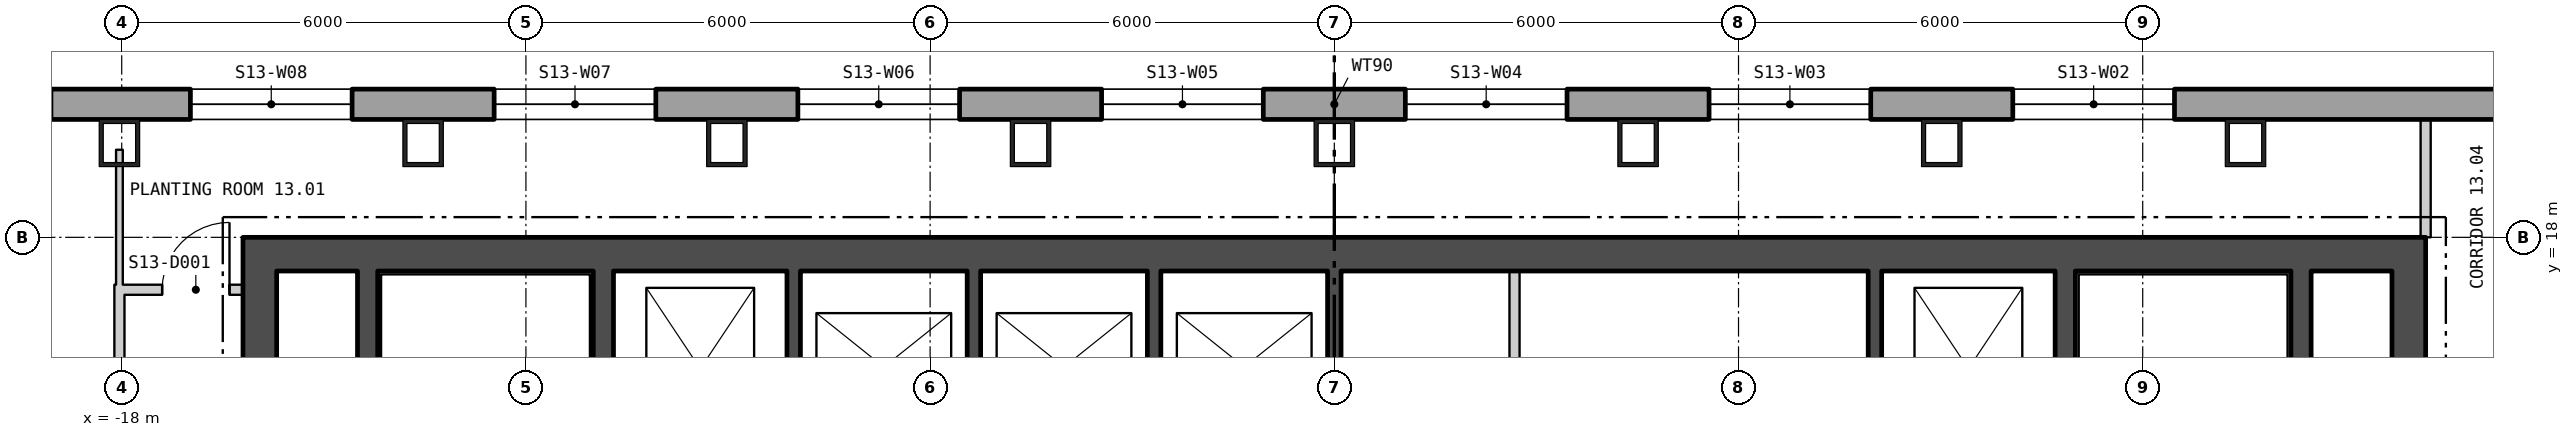
"""IFC4 building model, lengths in metres.
Left out: names, types, materials, properties, quantities, classifications, styles, units other than length and angle.
Written with IfcOpenShell. Run it as: python <this file> out.ifc"""

import sys

from ifc_helpers import new_model, si_unit, direction, frame, frame_2d, origin, origin_2d, place, context, subcontext, project, spatial, polyline, rectangle, hollow_rectangle, outline, extrude, element, fill, save


model = new_model("IFC4")
c1 = context("Model", 3, precision=1e-05, world=origin(), true_north=direction((0.0, 1.0)))
c2 = subcontext(c1, "Body", "Model", "MODEL_VIEW")
j1 = project(units=[si_unit("LENGTHUNIT", "METRE"), si_unit("PLANEANGLEUNIT", "RADIAN")], contexts=[c1])
p1 = place(None, origin())
s1 = spatial("IfcSite", under=j1, at=p1, CompositionType="ELEMENT")
p2 = place(p1, origin())
s2 = spatial("IfcBuilding", under=s1, at=p2, CompositionType="ELEMENT")
p3 = place(p2, frame((0.0, 0.0, 174.9)))
s3 = spatial("IfcBuildingStorey", under=s2, at=p3, CompositionType="ELEMENT", Elevation=174.9)
for number, where, z_axis, x_axis in (
    (1, (13.526, 19.4, 0.0), (0.0, 0.0, 1.0), (-1.0, 0.0, 0.0)),
    (2, (9.017, 19.4, 0.0), (0.0, 0.0, 1.0), (-1.0, 0.0, 0.0)),
    (3, (4.509, 19.4, 0.0), (0.0, 0.0, 1.0), (-1.0, 0.0, 0.0)),
    (4, (0.0, 19.4, 0.0), (0.0, 0.0, 1.0), (-1.0, 0.0, 0.0)),
    (5, (-4.509, 19.4, 0.0), (0.0, 0.0, 1.0), (-1.0, 0.0, 0.0)),
    (6, (-9.017, 19.4, 0.0), (0.0, 0.0, 1.0), (-1.0, 0.0, 0.0)),
    (7, (-13.526, 19.4, 0.0), (0.0, 0.0, 1.0), (-1.0, 0.0, 0.0)),
    (8, (-18.034, 19.4, 0.0), (0.0, 0.0, 1.0), (-1.0, 0.0, 0.0)),
):
    element("IfcColumn", number, at=place(p3, frame(where, z_axis=z_axis, x_axis=x_axis)), inside=s3, PredefinedType="COLUMN", context=c2, shape_type="SweptSolid", body=[
        extrude(hollow_rectangle(XDim=0.6, YDim=0.7, WallThickness=0.06, at=origin_2d()), origin(), (0.0, 0.0, 1.0), 3.9),
    ])
p4 = place(p3, frame((22.875, 19.975, -0.4), z_axis=(0.0, 0.0, 1.0), x_axis=(-1.0, 0.0, 0.0)))
e9 = element("IfcWall", 9, at=p4, inside=s3, PredefinedType="SOLIDWALL", context=c2, shape_type="SweptSolid", body=[
    extrude(outline(polyline([(-0.13, -0.225), (45.88, -0.225), (45.62, 0.225), (0.13, 0.225), (-0.13, -0.225)])), origin(), (0.0, 0.0, 1.0), 3.9),
])
p5 = place(p4, frame((1.425, 0.0, 1.3)))
e10 = element("IfcOpeningElement", 10, at=p5, cuts=e9, PredefinedType="OPENING", context=c2, shape_type="SweptSolid", body=[
    extrude(rectangle(XDim=2.4, YDim=2.0, at=frame_2d((1.2, 1.0))), frame((0.0, 0.235, 0.0), z_axis=(0.0, -1.0, 0.0), x_axis=(1.0, 0.0, 0.0)), (0.0, 0.0, 1.0), 0.47),
])
p6 = place(p4, frame((10.403, 0.0, 1.3)))
e11 = element("IfcOpeningElement", 11, at=p6, cuts=e9, PredefinedType="OPENING", context=c2, shape_type="SweptSolid", body=[
    extrude(rectangle(XDim=2.4, YDim=2.0, at=frame_2d((1.2, 1.0))), frame((0.0, 0.235, 0.0), z_axis=(0.0, -1.0, 0.0), x_axis=(1.0, 0.0, 0.0)), (0.0, 0.0, 1.0), 0.47),
])
p7 = place(p4, frame((14.912, 0.0, 1.3)))
e12 = element("IfcOpeningElement", 12, at=p7, cuts=e9, PredefinedType="OPENING", context=c2, shape_type="SweptSolid", body=[
    extrude(rectangle(XDim=2.4, YDim=2.0, at=frame_2d((1.2, 1.0))), frame((0.0, 0.235, 0.0), z_axis=(0.0, -1.0, 0.0), x_axis=(1.0, 0.0, 0.0)), (0.0, 0.0, 1.0), 0.47),
])
p8 = place(p4, frame((19.421, 0.0, 1.3)))
e13 = element("IfcOpeningElement", 13, at=p8, cuts=e9, PredefinedType="OPENING", context=c2, shape_type="SweptSolid", body=[
    extrude(rectangle(XDim=2.4, YDim=2.0, at=frame_2d((1.2, 1.0))), frame((0.0, 0.235, 0.0), z_axis=(0.0, -1.0, 0.0), x_axis=(1.0, 0.0, 0.0)), (0.0, 0.0, 1.0), 0.47),
])
p9 = place(p4, frame((23.929, 0.0, 1.3)))
e14 = element("IfcOpeningElement", 14, at=p9, cuts=e9, PredefinedType="OPENING", context=c2, shape_type="SweptSolid", body=[
    extrude(rectangle(XDim=2.4, YDim=2.0, at=frame_2d((1.2, 1.0))), frame((0.0, 0.235, 0.0), z_axis=(0.0, -1.0, 0.0), x_axis=(1.0, 0.0, 0.0)), (0.0, 0.0, 1.0), 0.47),
])
p10 = place(p4, frame((28.438, 0.0, 1.3)))
e15 = element("IfcOpeningElement", 15, at=p10, cuts=e9, PredefinedType="OPENING", context=c2, shape_type="SweptSolid", body=[
    extrude(rectangle(XDim=2.4, YDim=2.0, at=frame_2d((1.2, 1.0))), frame((0.0, 0.235, 0.0), z_axis=(0.0, -1.0, 0.0), x_axis=(1.0, 0.0, 0.0)), (0.0, 0.0, 1.0), 0.47),
])
p11 = place(p4, frame((32.947, 0.0, 1.3)))
e16 = element("IfcOpeningElement", 16, at=p11, cuts=e9, PredefinedType="OPENING", context=c2, shape_type="SweptSolid", body=[
    extrude(rectangle(XDim=2.4, YDim=2.0, at=frame_2d((1.2, 1.0))), frame((0.0, 0.235, 0.0), z_axis=(0.0, -1.0, 0.0), x_axis=(1.0, 0.0, 0.0)), (0.0, 0.0, 1.0), 0.47),
])
p12 = place(p4, frame((37.455, 0.0, 1.3)))
e17 = element("IfcOpeningElement", 17, at=p12, cuts=e9, PredefinedType="OPENING", context=c2, shape_type="SweptSolid", body=[
    extrude(rectangle(XDim=2.4, YDim=2.0, at=frame_2d((1.2, 1.0))), frame((0.0, 0.235, 0.0), z_axis=(0.0, -1.0, 0.0), x_axis=(1.0, 0.0, 0.0)), (0.0, 0.0, 1.0), 0.47),
])
p13 = place(p4, frame((41.925, 0.0, 1.3)))
e18 = element("IfcOpeningElement", 18, at=p13, cuts=e9, PredefinedType="OPENING", context=c2, shape_type="SweptSolid", body=[
    extrude(rectangle(XDim=2.4, YDim=2.0, at=frame_2d((1.2, 1.0))), frame((0.0, 0.235, 0.0), z_axis=(0.0, -1.0, 0.0), x_axis=(1.0, 0.0, 0.0)), (0.0, 0.0, 1.0), 0.47),
])
p14 = place(p3, frame((-16.2, 17.75, 0.0), z_axis=(0.0, 0.0, 1.0), x_axis=(1.0, 0.0, 0.0)))
e19 = element("IfcWall", 19, at=p14, inside=s3, PredefinedType="SHEAR", context=c2, shape_type="SweptSolid", body=[
    extrude(rectangle(XDim=32.4, YDim=0.5, at=frame_2d((16.2, 0.0))), origin(), (0.0, 0.0, 1.0), 3.7),
])
p15 = place(p3, frame((-15.95, 2.5, 0.0), z_axis=(0.0, 0.0, 1.0), x_axis=(0.0, 1.0, 0.0)))
e20 = element("IfcWall", 20, at=p15, inside=s3, PredefinedType="SHEAR", context=c2, shape_type="SweptSolid", body=[
    extrude(rectangle(XDim=15.0, YDim=0.5, at=frame_2d((7.5, 0.0))), origin(), (0.0, 0.0, 1.0), 3.7),
])
p16 = place(p15, frame((4.35, 0.0, 0.0)))
e21 = element("IfcOpeningElement", 21, at=p16, cuts=e20, PredefinedType="OPENING", context=c2, shape_type="SweptSolid", body=[
    extrude(rectangle(XDim=1.5, YDim=2.1, at=frame_2d((0.75, 1.05))), frame((0.0, 0.26, 0.0), z_axis=(0.0, -1.0, 0.0), x_axis=(1.0, 0.0, 0.0)), (0.0, 0.0, 1.0), 0.52),
])
p17 = place(p15, frame((0.4, 0.0, 0.0)))
e22 = element("IfcOpeningElement", 22, at=p17, cuts=e20, PredefinedType="OPENING", context=c2, shape_type="SweptSolid", body=[
    extrude(rectangle(XDim=1.0, YDim=2.1, at=frame_2d((0.5, 1.05))), frame((0.0, 0.26, 0.0), z_axis=(0.0, -1.0, 0.0), x_axis=(1.0, 0.0, 0.0)), (0.0, 0.0, 1.0), 0.52),
])
p18 = place(p15, frame((2.475, 0.0, 0.0)))
e23 = element("IfcOpeningElement", 23, at=p18, cuts=e20, PredefinedType="OPENING", context=c2, shape_type="SweptSolid", body=[
    extrude(rectangle(XDim=0.9, YDim=2.1, at=frame_2d((0.45, 1.05))), frame((0.0, 0.26, 0.0), z_axis=(0.0, -1.0, 0.0), x_axis=(1.0, 0.0, 0.0)), (0.0, 0.0, 1.0), 0.52),
])
p19 = place(p15, frame((6.677, 0.0, 0.0)))
e24 = element("IfcOpeningElement", 24, at=p19, cuts=e20, PredefinedType="OPENING", context=c2, shape_type="SweptSolid", body=[
    extrude(rectangle(XDim=0.9, YDim=2.1, at=frame_2d((0.45, 1.05))), frame((0.0, 0.26, 0.0), z_axis=(0.0, -1.0, 0.0), x_axis=(1.0, 0.0, 0.0)), (0.0, 0.0, 1.0), 0.52),
])
p20 = place(p15, frame((11.252, 0.0, 0.0)))
e25 = element("IfcOpeningElement", 25, at=p20, cuts=e20, PredefinedType="OPENING", context=c2, shape_type="SweptSolid", body=[
    extrude(rectangle(XDim=0.9, YDim=2.1, at=frame_2d((0.45, 1.05))), frame((0.0, 0.26, 0.0), z_axis=(0.0, -1.0, 0.0), x_axis=(1.0, 0.0, 0.0)), (0.0, 0.0, 1.0), 0.52),
])
p21 = place(p3, frame((15.95, 2.5, 0.0), z_axis=(0.0, 0.0, 1.0), x_axis=(0.0, 1.0, 0.0)))
e26 = element("IfcWall", 26, at=p21, inside=s3, PredefinedType="SHEAR", context=c2, shape_type="SweptSolid", body=[
    extrude(rectangle(XDim=15.0, YDim=0.5, at=frame_2d((7.5, 0.0))), origin(), (0.0, 0.0, 1.0), 3.7),
])
p22 = place(p21, frame((4.35, 0.0, 0.0)))
e27 = element("IfcOpeningElement", 27, at=p22, cuts=e26, PredefinedType="OPENING", context=c2, shape_type="SweptSolid", body=[
    extrude(rectangle(XDim=1.5, YDim=2.1, at=frame_2d((0.75, 1.05))), frame((0.0, 0.26, 0.0), z_axis=(0.0, -1.0, 0.0), x_axis=(1.0, 0.0, 0.0)), (0.0, 0.0, 1.0), 0.52),
])
p23 = place(p21, frame((0.825, 0.0, 0.0)))
e28 = element("IfcOpeningElement", 28, at=p23, cuts=e26, PredefinedType="OPENING", context=c2, shape_type="SweptSolid", body=[
    extrude(rectangle(XDim=0.9, YDim=2.1, at=frame_2d((0.45, 1.05))), frame((0.0, 0.26, 0.0), z_axis=(0.0, -1.0, 0.0), x_axis=(1.0, 0.0, 0.0)), (0.0, 0.0, 1.0), 0.52),
])
p24 = place(p21, frame((3.0, 0.0, 0.0)))
e29 = element("IfcOpeningElement", 29, at=p24, cuts=e26, PredefinedType="OPENING", context=c2, shape_type="SweptSolid", body=[
    extrude(rectangle(XDim=0.9, YDim=2.1, at=frame_2d((0.45, 1.05))), frame((0.0, 0.26, 0.0), z_axis=(0.0, -1.0, 0.0), x_axis=(1.0, 0.0, 0.0)), (0.0, 0.0, 1.0), 0.52),
])
p25 = place(p21, frame((6.716, 0.0, 0.0)))
e30 = element("IfcOpeningElement", 30, at=p25, cuts=e26, PredefinedType="OPENING", context=c2, shape_type="SweptSolid", body=[
    extrude(rectangle(XDim=1.0, YDim=2.1, at=frame_2d((0.5, 1.05))), frame((0.0, 0.26, 0.0), z_axis=(0.0, -1.0, 0.0), x_axis=(1.0, 0.0, 0.0)), (0.0, 0.0, 1.0), 0.52),
])
p26 = place(p21, frame((11.341, 0.0, 0.0)))
e31 = element("IfcOpeningElement", 31, at=p26, cuts=e26, PredefinedType="OPENING", context=c2, shape_type="SweptSolid", body=[
    extrude(rectangle(XDim=0.9, YDim=2.1, at=frame_2d((0.45, 1.05))), frame((0.0, 0.26, 0.0), z_axis=(0.0, -1.0, 0.0), x_axis=(1.0, 0.0, 0.0)), (0.0, 0.0, 1.0), 0.52),
])
p27 = place(p3, frame((-10.85, 2.5, 0.0), z_axis=(0.0, 0.0, 1.0), x_axis=(0.0, 1.0, 0.0)))
e32 = element("IfcWall", 32, at=p27, inside=s3, PredefinedType="SHEAR", context=c2, shape_type="SweptSolid", body=[
    extrude(rectangle(XDim=15.0, YDim=0.3, at=frame_2d((7.5, 0.0))), origin(), (0.0, 0.0, 1.0), 3.7),
])
p28 = place(p27, frame((3.475, 0.0, 0.0)))
e33 = element("IfcOpeningElement", 33, at=p28, cuts=e32, PredefinedType="OPENING", context=c2, shape_type="SweptSolid", body=[
    extrude(rectangle(XDim=1.25, YDim=2.1, at=frame_2d((0.625, 1.05))), frame((0.0, 0.16, 0.0), z_axis=(0.0, -1.0, 0.0), x_axis=(1.0, 0.0, 0.0)), (0.0, 0.0, 1.0), 0.32),
])
p29 = place(p27, frame((1.125, 0.0, 0.0)))
e34 = element("IfcOpeningElement", 34, at=p29, cuts=e32, PredefinedType="OPENING", context=c2, shape_type="SweptSolid", body=[
    extrude(rectangle(XDim=1.0, YDim=2.1, at=frame_2d((0.5, 1.05))), frame((0.0, 0.16, 0.0), z_axis=(0.0, -1.0, 0.0), x_axis=(1.0, 0.0, 0.0)), (0.0, 0.0, 1.0), 0.32),
])
p30 = place(p3, frame((-14.35, 2.5, 0.0), z_axis=(0.0, 0.0, 1.0), x_axis=(0.0, 1.0, 0.0)))
e35 = element("IfcWall", 35, at=p30, inside=s3, PredefinedType="SHEAR", context=c2, shape_type="SweptSolid", body=[
    extrude(rectangle(XDim=15.0, YDim=0.3, at=frame_2d((7.5, 0.0))), origin(), (0.0, 0.0, 1.0), 3.7),
])
p31 = place(p30, frame((4.35, 0.0, 0.0)))
e36 = element("IfcOpeningElement", 36, at=p31, cuts=e35, PredefinedType="OPENING", context=c2, shape_type="SweptSolid", body=[
    extrude(rectangle(XDim=1.5, YDim=2.1, at=frame_2d((0.75, 1.05))), frame((0.0, 0.16, 0.0), z_axis=(0.0, -1.0, 0.0), x_axis=(1.0, 0.0, 0.0)), (0.0, 0.0, 1.0), 0.32),
])
p32 = place(p3, frame((10.85, 2.5, 0.0), z_axis=(0.0, 0.0, 1.0), x_axis=(0.0, 1.0, 0.0)))
e37 = element("IfcWall", 37, at=p32, inside=s3, PredefinedType="SHEAR", context=c2, shape_type="SweptSolid", body=[
    extrude(rectangle(XDim=15.0, YDim=0.3, at=frame_2d((7.5, 0.0))), origin(), (0.0, 0.0, 1.0), 3.7),
])
p33 = place(p32, frame((3.475, 0.0, 0.0)))
e38 = element("IfcOpeningElement", 38, at=p33, cuts=e37, PredefinedType="OPENING", context=c2, shape_type="SweptSolid", body=[
    extrude(rectangle(XDim=1.25, YDim=2.1, at=frame_2d((0.625, 1.05))), frame((0.0, 0.16, 0.0), z_axis=(0.0, -1.0, 0.0), x_axis=(1.0, 0.0, 0.0)), (0.0, 0.0, 1.0), 0.32),
])
p34 = place(p32, frame((1.125, 0.0, 0.0)))
e39 = element("IfcOpeningElement", 39, at=p34, cuts=e37, PredefinedType="OPENING", context=c2, shape_type="SweptSolid", body=[
    extrude(rectangle(XDim=1.0, YDim=2.1, at=frame_2d((0.5, 1.05))), frame((0.0, 0.16, 0.0), z_axis=(0.0, -1.0, 0.0), x_axis=(1.0, 0.0, 0.0)), (0.0, 0.0, 1.0), 0.32),
])
p35 = place(p3, frame((14.35, 2.5, 0.0), z_axis=(0.0, 0.0, 1.0), x_axis=(0.0, 1.0, 0.0)))
e40 = element("IfcWall", 40, at=p35, inside=s3, PredefinedType="SHEAR", context=c2, shape_type="SweptSolid", body=[
    extrude(rectangle(XDim=15.0, YDim=0.3, at=frame_2d((7.5, 0.0))), origin(), (0.0, 0.0, 1.0), 3.7),
])
p36 = place(p35, frame((4.35, 0.0, 0.0)))
e41 = element("IfcOpeningElement", 41, at=p36, cuts=e40, PredefinedType="OPENING", context=c2, shape_type="SweptSolid", body=[
    extrude(rectangle(XDim=1.5, YDim=2.1, at=frame_2d((0.75, 1.05))), frame((0.0, 0.16, 0.0), z_axis=(0.0, -1.0, 0.0), x_axis=(1.0, 0.0, 0.0)), (0.0, 0.0, 1.0), 0.32),
])
for number, where, z_axis, x_axis in (
    (42, (-8.025, 14.7, 0.0), (0.0, 0.0, 1.0), (0.0, 1.0, 0.0)),
    (43, (-5.35, 14.7, 0.0), (0.0, 0.0, 1.0), (0.0, 1.0, 0.0)),
    (44, (-2.675, 14.7, 0.0), (0.0, 0.0, 1.0), (0.0, 1.0, 0.0)),
    (45, (0.0, 14.7, 0.0), (0.0, 0.0, 1.0), (0.0, 1.0, 0.0)),
):
    element("IfcWall", number, at=place(p3, frame(where, z_axis=z_axis, x_axis=x_axis)), inside=s3, PredefinedType="SHEAR", context=c2, shape_type="SweptSolid", body=[
        extrude(rectangle(XDim=2.8, YDim=0.2, at=frame_2d((1.4, 0.0))), origin(), (0.0, 0.0, 1.0), 3.7),
    ])
p37 = place(p3, frame((2.675, 14.7, 0.0), z_axis=(0.0, 0.0, 1.0), x_axis=(0.0, 1.0, 0.0)))
e46 = element("IfcWall", 46, at=p37, inside=s3, PredefinedType="PARTITIONING", context=c2, shape_type="SweptSolid", body=[
    extrude(rectangle(XDim=2.8, YDim=0.15, at=frame_2d((1.4, 0.0))), origin(), (0.0, 0.0, 1.0), 3.7),
])
p38 = place(p3, frame((8.025, 14.7, 0.0), z_axis=(0.0, 0.0, 1.0), x_axis=(0.0, 1.0, 0.0)))
e47 = element("IfcWall", 47, at=p38, inside=s3, PredefinedType="SHEAR", context=c2, shape_type="SweptSolid", body=[
    extrude(rectangle(XDim=2.8, YDim=0.2, at=frame_2d((1.4, 0.0))), origin(), (0.0, 0.0, 1.0), 3.7),
])
p39 = place(p3, frame((-18.034, 12.677, 0.0), z_axis=(0.0, 0.0, 1.0), x_axis=(0.0, 1.0, 0.0)))
e48 = element("IfcWall", 48, at=p39, inside=s3, PredefinedType="PARTITIONING", context=c2, shape_type="SweptSolid", body=[
    extrude(rectangle(XDim=4.62, YDim=0.15, at=frame_2d((2.31, 0.0))), origin(), (0.0, 0.0, 1.0), 3.7),
])
p40 = place(p3, frame((-18.034, 17.297, 0.0), z_axis=(0.0, 0.0, 1.0), x_axis=(0.0, 1.0, 0.0)))
e49 = element("IfcWall", 49, at=p40, inside=s3, PredefinedType="PARTITIONING", context=c2, shape_type="SweptSolid", body=[
    extrude(rectangle(XDim=2.003, YDim=0.1, at=frame_2d((1.002, 0.0))), origin(), (0.0, 0.0, 1.0), 3.7),
])
p41 = place(p3, frame((-17.959, 17.222, 0.0), z_axis=(0.0, 0.0, 1.0), x_axis=(1.0, 0.0, 0.0)))
e50 = element("IfcWall", 50, at=p41, inside=s3, PredefinedType="PARTITIONING", context=c2, shape_type="SweptSolid", body=[
    extrude(rectangle(XDim=1.759, YDim=0.15, at=frame_2d((0.879, 0.0))), origin(), (0.0, 0.0, 1.0), 3.7),
])
p42 = place(p41, frame((0.559, 0.0, 0.0)))
e51 = element("IfcOpeningElement", 51, at=p42, cuts=e50, PredefinedType="OPENING", context=c2, shape_type="SweptSolid", body=[
    extrude(rectangle(XDim=1.0, YDim=2.1, at=frame_2d((0.5, 1.05))), frame((0.0, 0.085, 0.0), z_axis=(0.0, -1.0, 0.0), x_axis=(1.0, 0.0, 0.0)), (0.0, 0.0, 1.0), 0.17),
])
p43 = place(p3, frame((16.2, 18.0, 0.0), z_axis=(0.0, 0.0, 1.0), x_axis=(0.0, 1.0, 0.0)))
e52 = element("IfcWall", 52, at=p43, inside=s3, PredefinedType="PARTITIONING", context=c2, shape_type="SweptSolid", body=[
    extrude(rectangle(XDim=1.75, YDim=0.15, at=frame_2d((0.875, 0.0))), origin(), (0.0, 0.0, 1.0), 3.7),
])
p44 = place(p6, origin())
e53 = element("IfcWindow", 53, at=p44, inside=s3, PartitioningType="SINGLE_PANEL", PredefinedType="WINDOW", context=c2, shape_type="SweptSolid", body=[
    extrude(rectangle(XDim=2.4, YDim=2.0, at=frame_2d((1.2, 1.0))), frame((0.0, 0.105, 0.0), z_axis=(0.0, -1.0, 0.0), x_axis=(1.0, 0.0, 0.0)), (0.0, 0.0, 1.0), 0.06),
])
fill(e11, e53)
p45 = place(p7, origin())
e54 = element("IfcWindow", 54, at=p45, inside=s3, PartitioningType="SINGLE_PANEL", PredefinedType="WINDOW", context=c2, shape_type="SweptSolid", body=[
    extrude(rectangle(XDim=2.4, YDim=2.0, at=frame_2d((1.2, 1.0))), frame((0.0, 0.105, 0.0), z_axis=(0.0, -1.0, 0.0), x_axis=(1.0, 0.0, 0.0)), (0.0, 0.0, 1.0), 0.06),
])
fill(e12, e54)
p46 = place(p8, origin())
e55 = element("IfcWindow", 55, at=p46, inside=s3, PartitioningType="SINGLE_PANEL", PredefinedType="WINDOW", context=c2, shape_type="SweptSolid", body=[
    extrude(rectangle(XDim=2.4, YDim=2.0, at=frame_2d((1.2, 1.0))), frame((0.0, 0.105, 0.0), z_axis=(0.0, -1.0, 0.0), x_axis=(1.0, 0.0, 0.0)), (0.0, 0.0, 1.0), 0.06),
])
fill(e13, e55)
p47 = place(p9, origin())
e56 = element("IfcWindow", 56, at=p47, inside=s3, PartitioningType="SINGLE_PANEL", PredefinedType="WINDOW", context=c2, shape_type="SweptSolid", body=[
    extrude(rectangle(XDim=2.4, YDim=2.0, at=frame_2d((1.2, 1.0))), frame((0.0, 0.105, 0.0), z_axis=(0.0, -1.0, 0.0), x_axis=(1.0, 0.0, 0.0)), (0.0, 0.0, 1.0), 0.06),
])
fill(e14, e56)
p48 = place(p10, origin())
e57 = element("IfcWindow", 57, at=p48, inside=s3, PartitioningType="SINGLE_PANEL", PredefinedType="WINDOW", context=c2, shape_type="SweptSolid", body=[
    extrude(rectangle(XDim=2.4, YDim=2.0, at=frame_2d((1.2, 1.0))), frame((0.0, 0.105, 0.0), z_axis=(0.0, -1.0, 0.0), x_axis=(1.0, 0.0, 0.0)), (0.0, 0.0, 1.0), 0.06),
])
fill(e15, e57)
p49 = place(p11, origin())
e58 = element("IfcWindow", 58, at=p49, inside=s3, PartitioningType="SINGLE_PANEL", PredefinedType="WINDOW", context=c2, shape_type="SweptSolid", body=[
    extrude(rectangle(XDim=2.4, YDim=2.0, at=frame_2d((1.2, 1.0))), frame((0.0, 0.105, 0.0), z_axis=(0.0, -1.0, 0.0), x_axis=(1.0, 0.0, 0.0)), (0.0, 0.0, 1.0), 0.06),
])
fill(e16, e58)
p50 = place(p12, origin())
e59 = element("IfcWindow", 59, at=p50, inside=s3, PartitioningType="SINGLE_PANEL", PredefinedType="WINDOW", context=c2, shape_type="SweptSolid", body=[
    extrude(rectangle(XDim=2.4, YDim=2.0, at=frame_2d((1.2, 1.0))), frame((0.0, 0.105, 0.0), z_axis=(0.0, -1.0, 0.0), x_axis=(1.0, 0.0, 0.0)), (0.0, 0.0, 1.0), 0.06),
])
fill(e17, e59)
p51 = place(p42, origin())
e60 = element("IfcDoor", 60, at=p51, inside=s3, OperationType="SINGLE_SWING_LEFT", PredefinedType="DOOR", context=c2, shape_type="SweptSolid", body=[
    extrude(rectangle(XDim=1.0, YDim=2.1, at=frame_2d((0.5, 1.05))), frame((0.0, 0.025, 0.0), z_axis=(0.0, -1.0, 0.0), x_axis=(1.0, 0.0, 0.0)), (0.0, 0.0, 1.0), 0.05),
])
fill(e51, e60)
save(model, sys.argv[1])
